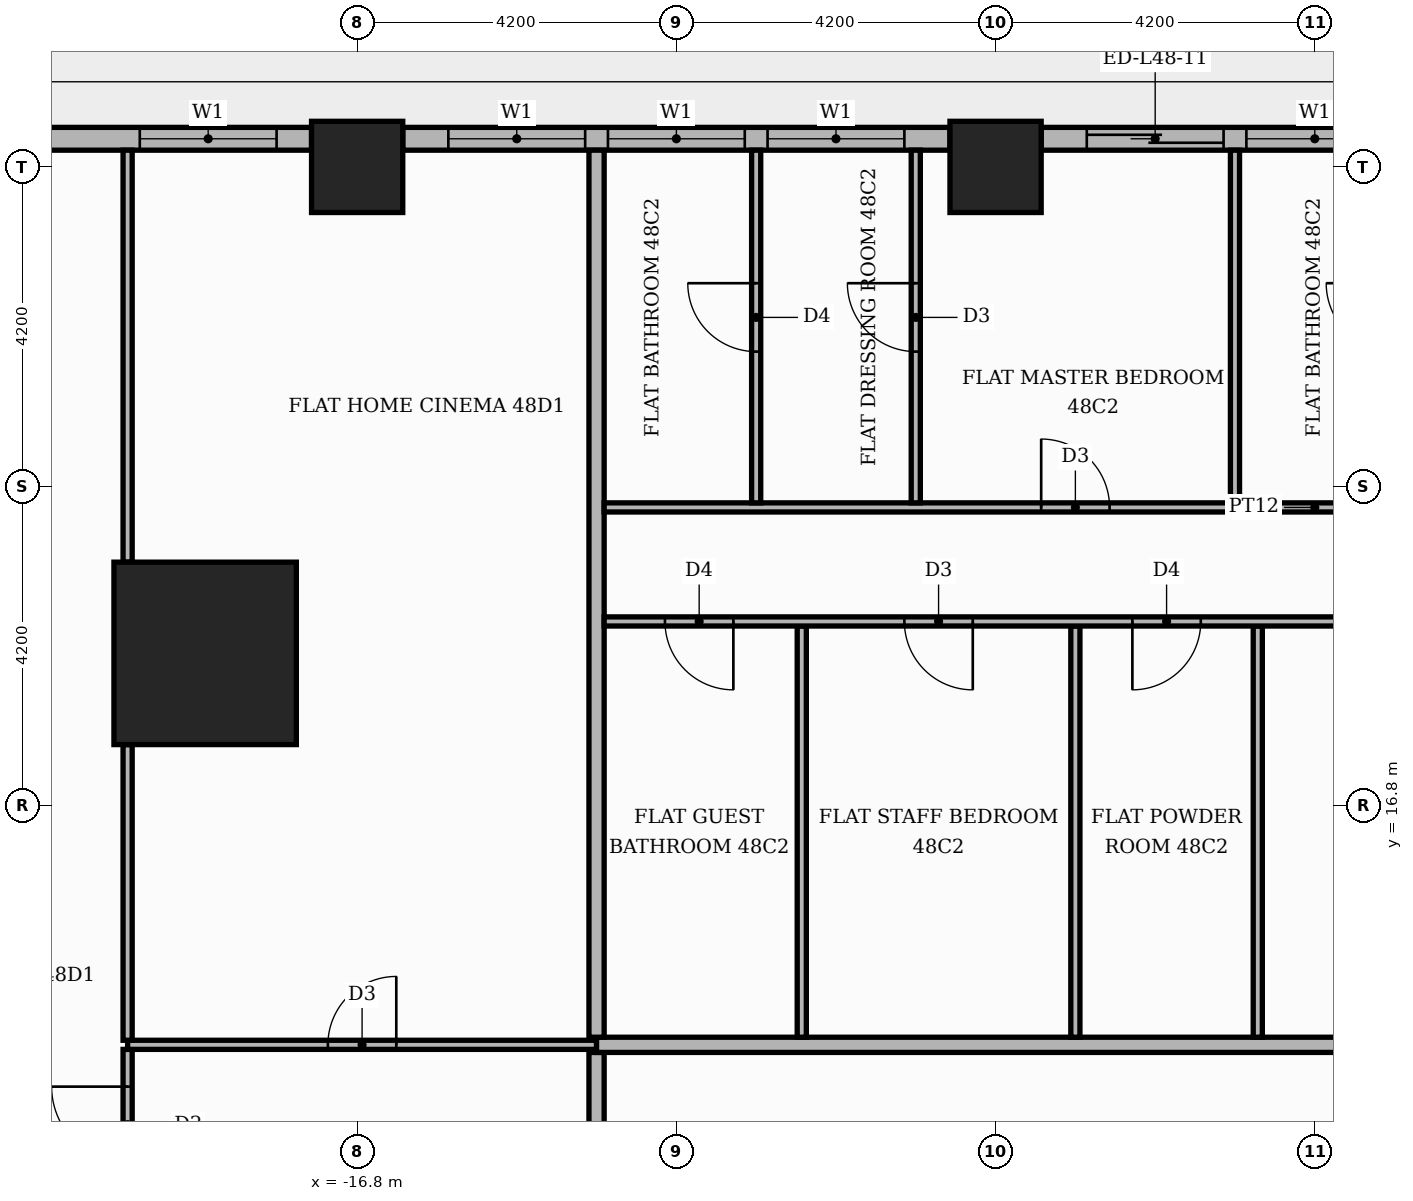
"""IFC4 building model, lengths in metres.
Left out: names, types, materials, properties, quantities, classifications, styles, units other than length and angle.
Written with IfcOpenShell. Run it as: python <this file> out.ifc"""

import sys

from ifc_helpers import new_model, si_unit, direction, frame, frame_2d, origin, origin_2d, place, context, subcontext, project, spatial, rectangle, extrude, element, fill, save


model = new_model("IFC4")
c1 = context("Model", 3, precision=1e-05, world=origin(), true_north=direction((0.0, 1.0)))
c2 = subcontext(c1, "Body", "Model", "MODEL_VIEW")
j1 = project(units=[si_unit("LENGTHUNIT", "METRE"), si_unit("PLANEANGLEUNIT", "RADIAN")], contexts=[c1])
p1 = place(None, origin())
s1 = spatial("IfcSite", under=j1, at=p1, CompositionType="ELEMENT")
p2 = place(p1, origin())
s2 = spatial("IfcBuilding", under=s1, at=p2, CompositionType="ELEMENT")
p3 = place(p2, frame((0.0, 0.0, 204.0)))
s3 = spatial("IfcBuildingStorey", under=s2, at=p3, CompositionType="ELEMENT", Elevation=204.0)
p4 = place(p3, frame((-18.8, 18.8, 0.0), z_axis=(0.0, 0.0, 1.0), x_axis=(1.0, 0.0, 0.0)))
e1 = element("IfcColumn", 1, at=p4, inside=s3, PredefinedType="COLUMN", context=c2, shape_type="SweptSolid", body=[
    extrude(rectangle(XDim=2.4, YDim=2.4, at=origin_2d()), origin(), (0.0, 0.0, 1.0), 3.9),
])
for number, where, z_axis, x_axis in (
    (2, (-8.4, 25.2, 0.0), (0.0, 0.0, 1.0), (1.0, 0.0, 0.0)),
    (3, (-16.8, 25.2, 0.0), (0.0, 0.0, 1.0), (1.0, 0.0, 0.0)),
):
    element("IfcColumn", number, at=place(p3, frame(where, z_axis=z_axis, x_axis=x_axis)), inside=s3, PredefinedType="COLUMN", context=c2, shape_type="SweptSolid", body=[
        extrude(rectangle(XDim=1.2, YDim=1.2, at=origin_2d()), origin(), (0.0, 0.0, 1.0), 3.9),
    ])
p5 = place(p3, frame((-0.6, 25.57, 0.0), z_axis=(0.0, 0.0, 1.0), x_axis=(-1.0, 0.0, 0.0)))
e4 = element("IfcWall", 4, at=p5, inside=s3, PredefinedType="STANDARD", context=c2, shape_type="SweptSolid", body=[
    extrude(rectangle(XDim=7.2, YDim=0.3, at=frame_2d((3.6, 0.0))), origin(), (0.0, 0.0, 1.0), 3.48),
])
p6 = place(p5, frame((0.6, 0.0, 0.9)))
e5 = element("IfcOpeningElement", 5, at=p6, cuts=e4, PredefinedType="OPENING", context=c2, shape_type="SweptSolid", body=[
    extrude(rectangle(XDim=1.8, YDim=2.1, at=frame_2d((0.9, 1.05))), frame((0.0, 0.16, 0.0), z_axis=(0.0, -1.0, 0.0), x_axis=(1.0, 0.0, 0.0)), (0.0, 0.0, 1.0), 0.32),
])
p7 = place(p5, frame((2.7, 0.0, 0.9)))
e6 = element("IfcOpeningElement", 6, at=p7, cuts=e4, PredefinedType="OPENING", context=c2, shape_type="SweptSolid", body=[
    extrude(rectangle(XDim=1.8, YDim=2.1, at=frame_2d((0.9, 1.05))), frame((0.0, 0.16, 0.0), z_axis=(0.0, -1.0, 0.0), x_axis=(1.0, 0.0, 0.0)), (0.0, 0.0, 1.0), 0.32),
])
p8 = place(p5, frame((4.8, 0.0, 0.0)))
e7 = element("IfcOpeningElement", 7, at=p8, cuts=e4, PredefinedType="OPENING", context=c2, shape_type="SweptSolid", body=[
    extrude(rectangle(XDim=1.8, YDim=2.4, at=frame_2d((0.9, 1.2))), frame((0.0, 0.16, 0.0), z_axis=(0.0, -1.0, 0.0), x_axis=(1.0, 0.0, 0.0)), (0.0, 0.0, 1.0), 0.32),
])
p9 = place(p3, frame((-9.0, 25.57, 0.0), z_axis=(0.0, 0.0, 1.0), x_axis=(-1.0, 0.0, 0.0)))
e8 = element("IfcWall", 8, at=p9, inside=s3, PredefinedType="STANDARD", context=c2, shape_type="SweptSolid", body=[
    extrude(rectangle(XDim=7.2, YDim=0.3, at=frame_2d((3.6, 0.0))), origin(), (0.0, 0.0, 1.0), 3.48),
])
p10 = place(p9, frame((0.6, 0.0, 0.9)))
e9 = element("IfcOpeningElement", 9, at=p10, cuts=e8, PredefinedType="OPENING", context=c2, shape_type="SweptSolid", body=[
    extrude(rectangle(XDim=1.8, YDim=2.1, at=frame_2d((0.9, 1.05))), frame((0.0, 0.16, 0.0), z_axis=(0.0, -1.0, 0.0), x_axis=(1.0, 0.0, 0.0)), (0.0, 0.0, 1.0), 0.32),
])
p11 = place(p9, frame((2.7, 0.0, 0.9)))
e10 = element("IfcOpeningElement", 10, at=p11, cuts=e8, PredefinedType="OPENING", context=c2, shape_type="SweptSolid", body=[
    extrude(rectangle(XDim=1.8, YDim=2.1, at=frame_2d((0.9, 1.05))), frame((0.0, 0.16, 0.0), z_axis=(0.0, -1.0, 0.0), x_axis=(1.0, 0.0, 0.0)), (0.0, 0.0, 1.0), 0.32),
])
p12 = place(p9, frame((4.8, 0.0, 0.9)))
e11 = element("IfcOpeningElement", 11, at=p12, cuts=e8, PredefinedType="OPENING", context=c2, shape_type="SweptSolid", body=[
    extrude(rectangle(XDim=1.8, YDim=2.1, at=frame_2d((0.9, 1.05))), frame((0.0, 0.16, 0.0), z_axis=(0.0, -1.0, 0.0), x_axis=(1.0, 0.0, 0.0)), (0.0, 0.0, 1.0), 0.32),
])
p13 = place(p3, frame((-17.4, 25.57, 0.0), z_axis=(0.0, 0.0, 1.0), x_axis=(-1.0, 0.0, 0.0)))
e12 = element("IfcWall", 12, at=p13, inside=s3, PredefinedType="STANDARD", context=c2, shape_type="SweptSolid", body=[
    extrude(rectangle(XDim=3.82, YDim=0.3, at=frame_2d((1.91, 0.0))), origin(), (0.0, 0.0, 1.0), 3.48),
])
p14 = place(p13, frame((0.46, 0.0, 0.9)))
e13 = element("IfcOpeningElement", 13, at=p14, cuts=e12, PredefinedType="OPENING", context=c2, shape_type="SweptSolid", body=[
    extrude(rectangle(XDim=1.8, YDim=2.1, at=frame_2d((0.9, 1.05))), frame((0.0, 0.16, 0.0), z_axis=(0.0, -1.0, 0.0), x_axis=(1.0, 0.0, 0.0)), (0.0, 0.0, 1.0), 0.32),
])
p15 = place(p3, frame((-13.65, -13.55, 0.0), z_axis=(0.0, 0.0, 1.0), x_axis=(0.0, 1.0, 0.0)))
e14 = element("IfcWall", 14, at=p15, inside=s3, PredefinedType="PARTITIONING", context=c2, shape_type="SweptSolid", body=[
    extrude(rectangle(XDim=27.1, YDim=0.2, at=frame_2d((13.55, 0.0))), origin(), (0.0, 0.0, 1.0), 3.48),
])
p16 = place(p15, frame((23.5, 0.0, 0.0)))
e15 = element("IfcOpeningElement", 15, at=p16, cuts=e14, PredefinedType="OPENING", context=c2, shape_type="SweptSolid", body=[
    extrude(rectangle(XDim=1.1, YDim=2.4, at=frame_2d((0.55, 1.2))), frame((0.0, 0.11, 0.0), z_axis=(0.0, -1.0, 0.0), x_axis=(1.0, 0.0, 0.0)), (0.0, 0.0, 1.0), 0.22),
])
p17 = place(p3, frame((-19.82, 11.61, 0.0), z_axis=(0.0, 0.0, 1.0), x_axis=(0.0, 1.0, 0.0)))
e16 = element("IfcWall", 16, at=p17, inside=s3, PredefinedType="PARTITIONING", context=c2, shape_type="SweptSolid", body=[
    extrude(rectangle(XDim=1.98, YDim=0.12, at=frame_2d((0.99, 0.0))), origin(), (0.0, 0.0, 1.0), 3.48),
])
p18 = place(p17, frame((0.49, 0.0, 0.0)))
e17 = element("IfcOpeningElement", 17, at=p18, cuts=e16, PredefinedType="OPENING", context=c2, shape_type="SweptSolid", body=[
    extrude(rectangle(XDim=1.0, YDim=2.1, at=frame_2d((0.5, 1.05))), frame((0.0, 0.07, 0.0), z_axis=(0.0, -1.0, 0.0), x_axis=(1.0, 0.0, 0.0)), (0.0, 0.0, 1.0), 0.14),
])
p19 = place(p3, frame((-19.82, 13.65, 0.0), z_axis=(0.0, 0.0, 1.0), x_axis=(1.0, 0.0, 0.0)))
e18 = element("IfcWall", 18, at=p19, inside=s3, PredefinedType="PARTITIONING", context=c2, shape_type="SweptSolid", body=[
    extrude(rectangle(XDim=6.17, YDim=0.12, at=frame_2d((3.085, 0.0))), origin(), (0.0, 0.0, 1.0), 3.48),
])
p20 = place(p19, frame((2.635, 0.0, 0.0)))
e19 = element("IfcOpeningElement", 19, at=p20, cuts=e18, PredefinedType="OPENING", context=c2, shape_type="SweptSolid", body=[
    extrude(rectangle(XDim=0.9, YDim=2.1, at=frame_2d((0.45, 1.05))), frame((0.0, 0.07, 0.0), z_axis=(0.0, -1.0, 0.0), x_axis=(1.0, 0.0, 0.0)), (0.0, 0.0, 1.0), 0.14),
])
p21 = place(p3, frame((-13.65, 13.65, 0.0), z_axis=(0.0, 0.0, 1.0), x_axis=(1.0, 0.0, 0.0)))
e20 = element("IfcWall", 20, at=p21, inside=s3, PredefinedType="PARTITIONING", context=c2, shape_type="SweptSolid", body=[
    extrude(rectangle(XDim=39.07, YDim=0.2, at=frame_2d((19.535, 0.0))), origin(), (0.0, 0.0, 1.0), 3.48),
])
p22 = place(p21, frame((24.65, 0.0, 0.0)))
e21 = element("IfcOpeningElement", 21, at=p22, cuts=e20, PredefinedType="OPENING", context=c2, shape_type="SweptSolid", body=[
    extrude(rectangle(XDim=1.1, YDim=2.4, at=frame_2d((0.55, 1.2))), frame((0.0, 0.11, 0.0), z_axis=(0.0, -1.0, 0.0), x_axis=(1.0, 0.0, 0.0)), (0.0, 0.0, 1.0), 0.22),
])
p23 = place(p21, frame((16.25, 0.0, 0.0)))
e22 = element("IfcOpeningElement", 22, at=p23, cuts=e20, PredefinedType="OPENING", context=c2, shape_type="SweptSolid", body=[
    extrude(rectangle(XDim=1.1, YDim=2.4, at=frame_2d((0.55, 1.2))), frame((0.0, 0.11, 0.0), z_axis=(0.0, -1.0, 0.0), x_axis=(1.0, 0.0, 0.0)), (0.0, 0.0, 1.0), 0.22),
])
p24 = place(p3, frame((-19.82, 13.71, 0.0), z_axis=(0.0, 0.0, 1.0), x_axis=(0.0, 1.0, 0.0)))
e23 = element("IfcWall", 23, at=p24, inside=s3, PredefinedType="PARTITIONING", context=c2, shape_type="SweptSolid", body=[
    extrude(rectangle(XDim=3.89, YDim=0.12, at=frame_2d((1.945, 0.0))), origin(), (0.0, 0.0, 1.0), 3.48),
])
p25 = place(p3, frame((-13.65, 13.75, 0.0), z_axis=(0.0, 0.0, 1.0), x_axis=(0.0, 1.0, 0.0)))
e24 = element("IfcWall", 24, at=p25, inside=s3, PredefinedType="PARTITIONING", context=c2, shape_type="SweptSolid", body=[
    extrude(rectangle(XDim=11.67, YDim=0.2, at=frame_2d((5.835, 0.0))), origin(), (0.0, 0.0, 1.0), 3.48),
])
for number, where, z_axis, x_axis in (
    (25, (-10.95, 13.75, 0.0), (0.0, 0.0, 1.0), (0.0, 1.0, 0.0)),
    (26, (-7.35, 13.75, 0.0), (0.0, 0.0, 1.0), (0.0, 1.0, 0.0)),
    (27, (-4.95, 13.75, 0.0), (0.0, 0.0, 1.0), (0.0, 1.0, 0.0)),
):
    element("IfcWall", number, at=place(p3, frame(where, z_axis=z_axis, x_axis=x_axis)), inside=s3, PredefinedType="PARTITIONING", context=c2, shape_type="SweptSolid", body=[
        extrude(rectangle(XDim=5.41, YDim=0.12, at=frame_2d((2.705, 0.0))), origin(), (0.0, 0.0, 1.0), 3.48),
    ])
p26 = place(p3, frame((-13.55, 19.22, 0.0), z_axis=(0.0, 0.0, 1.0), x_axis=(1.0, 0.0, 0.0)))
e28 = element("IfcWall", 28, at=p26, inside=s3, PredefinedType="PARTITIONING", context=c2, shape_type="SweptSolid", body=[
    extrude(rectangle(XDim=14.6, YDim=0.12, at=frame_2d((7.3, 0.0))), origin(), (0.0, 0.0, 1.0), 3.48),
])
p27 = place(p26, frame((11.15, 0.0, 0.0)))
e29 = element("IfcOpeningElement", 29, at=p27, cuts=e28, PredefinedType="OPENING", context=c2, shape_type="SweptSolid", body=[
    extrude(rectangle(XDim=0.9, YDim=2.1, at=frame_2d((0.45, 1.05))), frame((0.0, 0.07, 0.0), z_axis=(0.0, -1.0, 0.0), x_axis=(1.0, 0.0, 0.0)), (0.0, 0.0, 1.0), 0.14),
])
p28 = place(p26, frame((6.95, 0.0, 0.0)))
e30 = element("IfcOpeningElement", 30, at=p28, cuts=e28, PredefinedType="OPENING", context=c2, shape_type="SweptSolid", body=[
    extrude(rectangle(XDim=0.9, YDim=2.1, at=frame_2d((0.45, 1.05))), frame((0.0, 0.07, 0.0), z_axis=(0.0, -1.0, 0.0), x_axis=(1.0, 0.0, 0.0)), (0.0, 0.0, 1.0), 0.14),
])
p29 = place(p26, frame((3.95, 0.0, 0.0)))
e31 = element("IfcOpeningElement", 31, at=p29, cuts=e28, PredefinedType="OPENING", context=c2, shape_type="SweptSolid", body=[
    extrude(rectangle(XDim=0.9, YDim=2.1, at=frame_2d((0.45, 1.05))), frame((0.0, 0.07, 0.0), z_axis=(0.0, -1.0, 0.0), x_axis=(1.0, 0.0, 0.0)), (0.0, 0.0, 1.0), 0.14),
])
p30 = place(p26, frame((0.8, 0.0, 0.0)))
e32 = element("IfcOpeningElement", 32, at=p30, cuts=e28, PredefinedType="OPENING", context=c2, shape_type="SweptSolid", body=[
    extrude(rectangle(XDim=0.9, YDim=2.1, at=frame_2d((0.45, 1.05))), frame((0.0, 0.07, 0.0), z_axis=(0.0, -1.0, 0.0), x_axis=(1.0, 0.0, 0.0)), (0.0, 0.0, 1.0), 0.14),
])
p31 = place(p3, frame((-19.82, 20.0, 0.0), z_axis=(0.0, 0.0, 1.0), x_axis=(0.0, 1.0, 0.0)))
e33 = element("IfcWall", 33, at=p31, inside=s3, PredefinedType="PARTITIONING", context=c2, shape_type="SweptSolid", body=[
    extrude(rectangle(XDim=5.42, YDim=0.12, at=frame_2d((2.71, 0.0))), origin(), (0.0, 0.0, 1.0), 3.48),
])
p32 = place(p3, frame((-13.55, 20.72, 0.0), z_axis=(0.0, 0.0, 1.0), x_axis=(1.0, 0.0, 0.0)))
e34 = element("IfcWall", 34, at=p32, inside=s3, PredefinedType="PARTITIONING", context=c2, shape_type="SweptSolid", body=[
    extrude(rectangle(XDim=18.7, YDim=0.12, at=frame_2d((9.35, 0.0))), origin(), (0.0, 0.0, 1.0), 3.48),
])
p33 = place(p32, frame((16.2, 0.0, 0.0)))
e35 = element("IfcOpeningElement", 35, at=p33, cuts=e34, PredefinedType="OPENING", context=c2, shape_type="SweptSolid", body=[
    extrude(rectangle(XDim=1.0, YDim=2.1, at=frame_2d((0.5, 1.05))), frame((0.0, 0.07, 0.0), z_axis=(0.0, -1.0, 0.0), x_axis=(1.0, 0.0, 0.0)), (0.0, 0.0, 1.0), 0.14),
])
p34 = place(p32, frame((12.05, 0.0, 0.0)))
e36 = element("IfcOpeningElement", 36, at=p34, cuts=e34, PredefinedType="OPENING", context=c2, shape_type="SweptSolid", body=[
    extrude(rectangle(XDim=0.9, YDim=2.1, at=frame_2d((0.45, 1.05))), frame((0.0, 0.07, 0.0), z_axis=(0.0, -1.0, 0.0), x_axis=(1.0, 0.0, 0.0)), (0.0, 0.0, 1.0), 0.14),
])
p35 = place(p32, frame((5.75, 0.0, 0.0)))
e37 = element("IfcOpeningElement", 37, at=p35, cuts=e34, PredefinedType="OPENING", context=c2, shape_type="SweptSolid", body=[
    extrude(rectangle(XDim=0.9, YDim=2.1, at=frame_2d((0.45, 1.05))), frame((0.0, 0.07, 0.0), z_axis=(0.0, -1.0, 0.0), x_axis=(1.0, 0.0, 0.0)), (0.0, 0.0, 1.0), 0.14),
])
p36 = place(p3, frame((-11.55, 20.78, 0.0), z_axis=(0.0, 0.0, 1.0), x_axis=(0.0, 1.0, 0.0)))
e38 = element("IfcWall", 38, at=p36, inside=s3, PredefinedType="PARTITIONING", context=c2, shape_type="SweptSolid", body=[
    extrude(rectangle(XDim=4.64, YDim=0.12, at=frame_2d((2.32, 0.0))), origin(), (0.0, 0.0, 1.0), 3.48),
])
p37 = place(p36, frame((1.99, 0.0, 0.0)))
e39 = element("IfcOpeningElement", 39, at=p37, cuts=e38, PredefinedType="OPENING", context=c2, shape_type="SweptSolid", body=[
    extrude(rectangle(XDim=0.9, YDim=2.1, at=frame_2d((0.45, 1.05))), frame((0.0, 0.07, 0.0), z_axis=(0.0, -1.0, 0.0), x_axis=(1.0, 0.0, 0.0)), (0.0, 0.0, 1.0), 0.14),
])
p38 = place(p3, frame((-9.45, 20.78, 0.0), z_axis=(0.0, 0.0, 1.0), x_axis=(0.0, 1.0, 0.0)))
e40 = element("IfcWall", 40, at=p38, inside=s3, PredefinedType="PARTITIONING", context=c2, shape_type="SweptSolid", body=[
    extrude(rectangle(XDim=4.64, YDim=0.12, at=frame_2d((2.32, 0.0))), origin(), (0.0, 0.0, 1.0), 3.48),
])
p39 = place(p38, frame((1.99, 0.0, 0.0)))
e41 = element("IfcOpeningElement", 41, at=p39, cuts=e40, PredefinedType="OPENING", context=c2, shape_type="SweptSolid", body=[
    extrude(rectangle(XDim=0.9, YDim=2.1, at=frame_2d((0.45, 1.05))), frame((0.0, 0.07, 0.0), z_axis=(0.0, -1.0, 0.0), x_axis=(1.0, 0.0, 0.0)), (0.0, 0.0, 1.0), 0.14),
])
p40 = place(p3, frame((-5.25, 20.78, 0.0), z_axis=(0.0, 0.0, 1.0), x_axis=(0.0, 1.0, 0.0)))
e42 = element("IfcWall", 42, at=p40, inside=s3, PredefinedType="PARTITIONING", context=c2, shape_type="SweptSolid", body=[
    extrude(rectangle(XDim=4.64, YDim=0.12, at=frame_2d((2.32, 0.0))), origin(), (0.0, 0.0, 1.0), 3.48),
])
p41 = place(p7, origin())
e43 = element("IfcWindow", 43, at=p41, inside=s3, PartitioningType="SINGLE_PANEL", PredefinedType="WINDOW", context=c2, shape_type="SweptSolid", body=[
    extrude(rectangle(XDim=1.8, YDim=2.1, at=frame_2d((0.9, 1.05))), frame((0.0, 0.03, 0.0), z_axis=(0.0, -1.0, 0.0), x_axis=(1.0, 0.0, 0.0)), (0.0, 0.0, 1.0), 0.06),
])
fill(e6, e43)
p42 = place(p8, origin())
e44 = element("IfcDoor", 44, at=p42, inside=s3, OperationType="SLIDING_TO_RIGHT", PredefinedType="DOOR", context=c2, shape_type="SweptSolid", body=[
    extrude(rectangle(XDim=1.8, YDim=2.4, at=frame_2d((0.9, 1.2))), frame((0.0, 0.025, 0.0), z_axis=(0.0, -1.0, 0.0), x_axis=(1.0, 0.0, 0.0)), (0.0, 0.0, 1.0), 0.05),
])
fill(e7, e44)
p43 = place(p10, origin())
e45 = element("IfcWindow", 45, at=p43, inside=s3, PartitioningType="SINGLE_PANEL", PredefinedType="WINDOW", context=c2, shape_type="SweptSolid", body=[
    extrude(rectangle(XDim=1.8, YDim=2.1, at=frame_2d((0.9, 1.05))), frame((0.0, 0.03, 0.0), z_axis=(0.0, -1.0, 0.0), x_axis=(1.0, 0.0, 0.0)), (0.0, 0.0, 1.0), 0.06),
])
fill(e9, e45)
p44 = place(p11, origin())
e46 = element("IfcWindow", 46, at=p44, inside=s3, PartitioningType="SINGLE_PANEL", PredefinedType="WINDOW", context=c2, shape_type="SweptSolid", body=[
    extrude(rectangle(XDim=1.8, YDim=2.1, at=frame_2d((0.9, 1.05))), frame((0.0, 0.03, 0.0), z_axis=(0.0, -1.0, 0.0), x_axis=(1.0, 0.0, 0.0)), (0.0, 0.0, 1.0), 0.06),
])
fill(e10, e46)
p45 = place(p12, origin())
e47 = element("IfcWindow", 47, at=p45, inside=s3, PartitioningType="SINGLE_PANEL", PredefinedType="WINDOW", context=c2, shape_type="SweptSolid", body=[
    extrude(rectangle(XDim=1.8, YDim=2.1, at=frame_2d((0.9, 1.05))), frame((0.0, 0.03, 0.0), z_axis=(0.0, -1.0, 0.0), x_axis=(1.0, 0.0, 0.0)), (0.0, 0.0, 1.0), 0.06),
])
fill(e11, e47)
p46 = place(p14, origin())
e48 = element("IfcWindow", 48, at=p46, inside=s3, PartitioningType="SINGLE_PANEL", PredefinedType="WINDOW", context=c2, shape_type="SweptSolid", body=[
    extrude(rectangle(XDim=1.8, YDim=2.1, at=frame_2d((0.9, 1.05))), frame((0.0, 0.03, 0.0), z_axis=(0.0, -1.0, 0.0), x_axis=(1.0, 0.0, 0.0)), (0.0, 0.0, 1.0), 0.06),
])
fill(e13, e48)
p47 = place(p28, frame((0.9, 0.0, 0.0), z_axis=(0.0, 0.0, 1.0), x_axis=(-1.0, 0.0, 0.0)))
e49 = element("IfcDoor", 49, at=p47, inside=s3, OperationType="SINGLE_SWING_LEFT", PredefinedType="DOOR", context=c2, shape_type="SweptSolid", body=[
    extrude(rectangle(XDim=0.9, YDim=2.1, at=frame_2d((0.45, 1.05))), frame((0.0, 0.025, 0.0), z_axis=(0.0, -1.0, 0.0), x_axis=(1.0, 0.0, 0.0)), (0.0, 0.0, 1.0), 0.05),
])
fill(e30, e49)
p48 = place(p29, frame((0.9, 0.0, 0.0), z_axis=(0.0, 0.0, 1.0), x_axis=(-1.0, 0.0, 0.0)))
e50 = element("IfcDoor", 50, at=p48, inside=s3, OperationType="SINGLE_SWING_RIGHT", PredefinedType="DOOR", context=c2, shape_type="SweptSolid", body=[
    extrude(rectangle(XDim=0.9, YDim=2.1, at=frame_2d((0.45, 1.05))), frame((0.0, 0.025, 0.0), z_axis=(0.0, -1.0, 0.0), x_axis=(1.0, 0.0, 0.0)), (0.0, 0.0, 1.0), 0.05),
])
fill(e31, e50)
p49 = place(p30, frame((0.9, 0.0, 0.0), z_axis=(0.0, 0.0, 1.0), x_axis=(-1.0, 0.0, 0.0)))
e51 = element("IfcDoor", 51, at=p49, inside=s3, OperationType="SINGLE_SWING_RIGHT", PredefinedType="DOOR", context=c2, shape_type="SweptSolid", body=[
    extrude(rectangle(XDim=0.9, YDim=2.1, at=frame_2d((0.45, 1.05))), frame((0.0, 0.025, 0.0), z_axis=(0.0, -1.0, 0.0), x_axis=(1.0, 0.0, 0.0)), (0.0, 0.0, 1.0), 0.05),
])
fill(e32, e51)
p50 = place(p35, origin())
e52 = element("IfcDoor", 52, at=p50, inside=s3, OperationType="SINGLE_SWING_LEFT", PredefinedType="DOOR", context=c2, shape_type="SweptSolid", body=[
    extrude(rectangle(XDim=0.9, YDim=2.1, at=frame_2d((0.45, 1.05))), frame((0.0, 0.025, 0.0), z_axis=(0.0, -1.0, 0.0), x_axis=(1.0, 0.0, 0.0)), (0.0, 0.0, 1.0), 0.05),
])
fill(e37, e52)
p51 = place(p39, origin())
e53 = element("IfcDoor", 53, at=p51, inside=s3, OperationType="SINGLE_SWING_RIGHT", PredefinedType="DOOR", context=c2, shape_type="SweptSolid", body=[
    extrude(rectangle(XDim=0.9, YDim=2.1, at=frame_2d((0.45, 1.05))), frame((0.0, 0.025, 0.0), z_axis=(0.0, -1.0, 0.0), x_axis=(1.0, 0.0, 0.0)), (0.0, 0.0, 1.0), 0.05),
])
fill(e41, e53)
p52 = place(p37, origin())
e54 = element("IfcDoor", 54, at=p52, inside=s3, OperationType="SINGLE_SWING_RIGHT", PredefinedType="DOOR", context=c2, shape_type="SweptSolid", body=[
    extrude(rectangle(XDim=0.9, YDim=2.1, at=frame_2d((0.45, 1.05))), frame((0.0, 0.025, 0.0), z_axis=(0.0, -1.0, 0.0), x_axis=(1.0, 0.0, 0.0)), (0.0, 0.0, 1.0), 0.05),
])
fill(e39, e54)
p53 = place(p20, origin())
e55 = element("IfcDoor", 55, at=p53, inside=s3, OperationType="SINGLE_SWING_RIGHT", PredefinedType="DOOR", context=c2, shape_type="SweptSolid", body=[
    extrude(rectangle(XDim=0.9, YDim=2.1, at=frame_2d((0.45, 1.05))), frame((0.0, 0.025, 0.0), z_axis=(0.0, -1.0, 0.0), x_axis=(1.0, 0.0, 0.0)), (0.0, 0.0, 1.0), 0.05),
])
fill(e19, e55)
p54 = place(p18, origin())
e56 = element("IfcDoor", 56, at=p54, inside=s3, OperationType="SINGLE_SWING_RIGHT", PredefinedType="DOOR", context=c2, shape_type="SweptSolid", body=[
    extrude(rectangle(XDim=1.0, YDim=2.1, at=frame_2d((0.5, 1.05))), frame((0.0, 0.025, 0.0), z_axis=(0.0, -1.0, 0.0), x_axis=(1.0, 0.0, 0.0)), (0.0, 0.0, 1.0), 0.05),
])
fill(e17, e56)
save(model, sys.argv[1])
